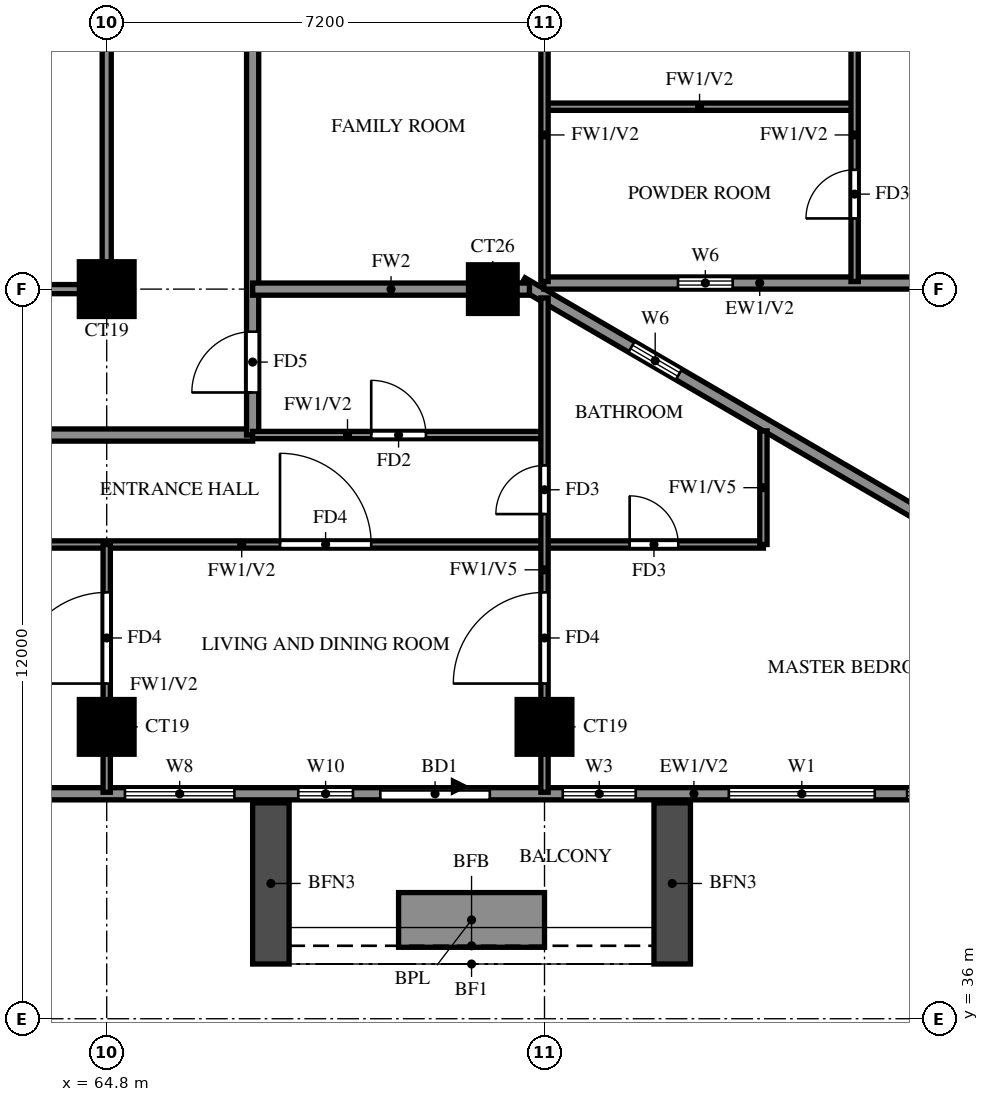
"""IFC4 building model, lengths in metres.
Left out: names, types, materials, properties, quantities, classifications, styles, units other than length and angle.
Written with IfcOpenShell. Run it as: python <this file> out.ifc"""

import sys

from ifc_helpers import new_model, si_unit, direction, frame, frame_2d, origin, origin_2d, place, context, subcontext, project, spatial, rectangle, extrude, source, transform, mapped, element, fill, save


model = new_model("IFC4")
c1 = context("Model", 3, precision=1e-05, world=origin(), true_north=direction((0.0, 1.0)))
c2 = subcontext(c1, "Body", "Model", "MODEL_VIEW")
j1 = project(units=[si_unit("LENGTHUNIT", "METRE"), si_unit("PLANEANGLEUNIT", "RADIAN")], contexts=[c1])
p1 = place(None, origin())
s1 = spatial("IfcSite", under=j1, at=p1, CompositionType="ELEMENT")
p2 = place(p1, origin())
s2 = spatial("IfcBuilding", under=s1, at=p2, CompositionType="ELEMENT")
p3 = place(p2, frame((0.0, 0.0, 185.0)))
s3 = spatial("IfcBuildingStorey", under=s2, at=p3, CompositionType="ELEMENT", Elevation=185.0)
m1 = source(origin(), c2, "Body", "SweptSolid", [
    extrude(rectangle(XDim=0.9, YDim=0.9, at=origin_2d()), origin(), (0.0, 0.0, 1.0), 3.2),
])
for number, where, z_axis, x_axis in (
    (1, (64.8, 40.8, 0.0), (0.0, 0.0, 1.0), (1.0, 0.0, 0.0)),
    (2, (72.0, 40.8, 0.0), (0.0, 0.0, 1.0), (1.0, 0.0, 0.0)),
    (3, (64.8, 48.0, 0.0), (0.0, 0.0, 1.0), (1.0, 0.0, 0.0)),
):
    element("IfcColumn", number, at=place(p3, frame(where, z_axis=z_axis, x_axis=x_axis)), inside=s3, PredefinedType="COLUMN", context=c2, shape_type="MappedRepresentation", body=[
        mapped(m1, transform((0.0, 0.0, 0.0))),
    ])
m2 = source(origin(), c2, "Body", "SweptSolid", [
    extrude(rectangle(XDim=0.8, YDim=0.8, at=origin_2d()), origin(), (0.0, 0.0, 1.0), 3.2),
])
p4 = place(p3, frame((71.15, 48.0, 0.0), z_axis=(0.0, 0.0, 1.0), x_axis=(1.0, 0.0, 0.0)))
e4 = element("IfcColumn", 4, at=p4, inside=s3, PredefinedType="COLUMN", context=c2, shape_type="MappedRepresentation", body=[
    mapped(m2, transform((0.0, 0.0, 0.0))),
])
p5 = place(p3, frame((85.719, 39.881, 0.0), z_axis=(0.0, 0.0, 1.0), x_axis=(-0.86377618652, 0.503875678716, 0.0)))
e5 = element("IfcWall", 5, at=p5, inside=s3, PredefinedType="SOLIDWALL", context=c2, shape_type="SweptSolid", body=[
    extrude(rectangle(XDim=16.311, YDim=0.2, at=frame_2d((8.156, 0.0))), origin(), (0.0, 0.0, 1.0), 3.2),
])
p6 = place(p5, frame((13.326, 0.0, 1.5)))
e6 = element("IfcOpeningElement", 6, at=p6, cuts=e5, PredefinedType="OPENING", context=c2, shape_type="SweptSolid", body=[
    extrude(rectangle(XDim=0.9, YDim=0.9, at=frame_2d((0.45, 0.45))), frame((0.0, 0.11, 0.0), z_axis=(0.0, -1.0, 0.0), x_axis=(1.0, 0.0, 0.0)), (0.0, 0.0, 1.0), 0.22),
])
p7 = place(p3, frame((71.99, 48.1, 0.0), z_axis=(0.0, 0.0, 1.0), x_axis=(1.0, 0.0, 0.0)))
e7 = element("IfcWall", 7, at=p7, inside=s3, PredefinedType="SOLIDWALL", context=c2, shape_type="SweptSolid", body=[
    extrude(rectangle(XDim=6.76, YDim=0.2, at=frame_2d((3.38, 0.0))), origin(), (0.0, 0.0, 1.0), 3.2),
])
p8 = place(p7, frame((2.205, 0.0, 1.5)))
e8 = element("IfcOpeningElement", 8, at=p8, cuts=e7, PredefinedType="OPENING", context=c2, shape_type="SweptSolid", body=[
    extrude(rectangle(XDim=0.9, YDim=0.9, at=frame_2d((0.45, 0.45))), frame((0.0, 0.11, 0.0), z_axis=(0.0, -1.0, 0.0), x_axis=(1.0, 0.0, 0.0)), (0.0, 0.0, 1.0), 0.22),
])
p9 = place(p3, frame((58.8, 39.7, 0.0), z_axis=(0.0, 0.0, 1.0), x_axis=(1.0, 0.0, 0.0)))
e9 = element("IfcWall", 9, at=p9, inside=s3, PredefinedType="SOLIDWALL", context=c2, shape_type="SweptSolid", body=[
    extrude(rectangle(XDim=27.23, YDim=0.2, at=frame_2d((13.615, 0.0))), origin(), (0.0, 0.0, 1.0), 3.2),
])
p10 = place(p9, frame((10.5, 0.0, 0.0)))
e10 = element("IfcOpeningElement", 10, at=p10, cuts=e9, PredefinedType="OPENING", context=c2, shape_type="SweptSolid", body=[
    extrude(rectangle(XDim=1.8, YDim=2.4, at=frame_2d((0.9, 1.2))), frame((0.0, 0.11, 0.0), z_axis=(0.0, -1.0, 0.0), x_axis=(1.0, 0.0, 0.0)), (0.0, 0.0, 1.0), 0.22),
])
p11 = place(p9, frame((6.3, 0.0, 0.6)))
e11 = element("IfcOpeningElement", 11, at=p11, cuts=e9, PredefinedType="OPENING", context=c2, shape_type="SweptSolid", body=[
    extrude(rectangle(XDim=1.8, YDim=2.4, at=frame_2d((0.9, 1.2))), frame((0.0, 0.11, 0.0), z_axis=(0.0, -1.0, 0.0), x_axis=(1.0, 0.0, 0.0)), (0.0, 0.0, 1.0), 0.22),
])
p12 = place(p9, frame((9.15, 0.0, 0.6)))
e12 = element("IfcOpeningElement", 12, at=p12, cuts=e9, PredefinedType="OPENING", context=c2, shape_type="SweptSolid", body=[
    extrude(rectangle(XDim=0.9, YDim=2.4, at=frame_2d((0.45, 1.2))), frame((0.0, 0.11, 0.0), z_axis=(0.0, -1.0, 0.0), x_axis=(1.0, 0.0, 0.0)), (0.0, 0.0, 1.0), 0.22),
])
p13 = place(p9, frame((13.5, 0.0, 0.6)))
e13 = element("IfcOpeningElement", 13, at=p13, cuts=e9, PredefinedType="OPENING", context=c2, shape_type="SweptSolid", body=[
    extrude(rectangle(XDim=1.2, YDim=2.4, at=frame_2d((0.6, 1.2))), frame((0.0, 0.11, 0.0), z_axis=(0.0, -1.0, 0.0), x_axis=(1.0, 0.0, 0.0)), (0.0, 0.0, 1.0), 0.22),
])
p14 = place(p9, frame((16.231, 0.0, 0.6)))
e14 = element("IfcOpeningElement", 14, at=p14, cuts=e9, PredefinedType="OPENING", context=c2, shape_type="SweptSolid", body=[
    extrude(rectangle(XDim=2.4, YDim=2.4, at=frame_2d((1.2, 1.2))), frame((0.0, 0.11, 0.0), z_axis=(0.0, -1.0, 0.0), x_axis=(1.0, 0.0, 0.0)), (0.0, 0.0, 1.0), 0.22),
])
p15 = place(p9, frame((19.163, 0.0, 0.6)))
e15 = element("IfcOpeningElement", 15, at=p15, cuts=e9, PredefinedType="OPENING", context=c2, shape_type="SweptSolid", body=[
    extrude(rectangle(XDim=2.4, YDim=2.4, at=frame_2d((1.2, 1.2))), frame((0.0, 0.11, 0.0), z_axis=(0.0, -1.0, 0.0), x_axis=(1.0, 0.0, 0.0)), (0.0, 0.0, 1.0), 0.22),
])
p16 = place(p9, frame((22.094, 0.0, 0.6)))
e16 = element("IfcOpeningElement", 16, at=p16, cuts=e9, PredefinedType="OPENING", context=c2, shape_type="SweptSolid", body=[
    extrude(rectangle(XDim=2.4, YDim=2.4, at=frame_2d((1.2, 1.2))), frame((0.0, 0.11, 0.0), z_axis=(0.0, -1.0, 0.0), x_axis=(1.0, 0.0, 0.0)), (0.0, 0.0, 1.0), 0.22),
])
p17 = place(p9, frame((25.978, 0.0, 0.6)))
e17 = element("IfcOpeningElement", 17, at=p17, cuts=e9, PredefinedType="OPENING", context=c2, shape_type="SweptSolid", body=[
    extrude(rectangle(XDim=0.9, YDim=2.4, at=frame_2d((0.45, 1.2))), frame((0.0, 0.11, 0.0), z_axis=(0.0, -1.0, 0.0), x_axis=(1.0, 0.0, 0.0)), (0.0, 0.0, 1.0), 0.22),
])
for number, where, z_axis, x_axis in (
    (18, (67.5, 39.55, 0.0), (0.0, 0.0, 1.0), (0.0, -1.0, 0.0)),
    (19, (74.1, 39.55, 0.0), (0.0, 0.0, 1.0), (0.0, -1.0, 0.0)),
):
    element("IfcWall", number, at=place(p3, frame(where, z_axis=z_axis, x_axis=x_axis)), inside=s3, PredefinedType="SOLIDWALL", context=c2, shape_type="SweptSolid", body=[
        extrude(rectangle(XDim=2.65, YDim=0.6, at=frame_2d((1.325, 0.0))), origin(), (0.0, 0.0, 1.0), 2.85),
    ])
p18 = place(p3, frame((69.6, 37.625, 0.0), z_axis=(0.0, 0.0, 1.0), x_axis=(1.0, 0.0, 0.0)))
e20 = element("IfcWall", 20, at=p18, inside=s3, PredefinedType="SOLIDWALL", context=c2, shape_type="SweptSolid", body=[
    extrude(rectangle(XDim=2.4, YDim=0.9, at=frame_2d((1.2, 0.0))), origin(), (0.0, 0.0, 1.0), 0.9),
])
p19 = place(p3, frame((60.0, 45.6, 0.0), z_axis=(0.0, 0.0, 1.0), x_axis=(1.0, 0.0, 0.0)))
e21 = element("IfcWall", 21, at=p19, inside=s3, PredefinedType="SOLIDWALL", context=c2, shape_type="SweptSolid", body=[
    extrude(rectangle(XDim=7.2, YDim=0.2, at=frame_2d((3.6, 0.0))), origin(), (0.0, 0.0, 1.0), 3.2),
])
p20 = place(p3, frame((67.2, 45.6, 0.0), z_axis=(0.0, 0.0, 1.0), x_axis=(0.0, 1.0, 0.0)))
e22 = element("IfcWall", 22, at=p20, inside=s3, PredefinedType="SOLIDWALL", context=c2, shape_type="SweptSolid", body=[
    extrude(rectangle(XDim=16.8, YDim=0.2, at=frame_2d((8.4, 0.0))), origin(), (0.0, 0.0, 1.0), 3.2),
])
p21 = place(p20, frame((8.3, 0.0, 0.0)))
e23 = element("IfcOpeningElement", 23, at=p21, cuts=e22, PredefinedType="OPENING", context=c2, shape_type="SweptSolid", body=[
    extrude(rectangle(XDim=1.0, YDim=2.1, at=frame_2d((0.5, 1.05))), frame((0.0, 0.11, 0.0), z_axis=(0.0, -1.0, 0.0), x_axis=(1.0, 0.0, 0.0)), (0.0, 0.0, 1.0), 0.22),
])
p22 = place(p20, frame((15.1, 0.0, 0.0)))
e24 = element("IfcOpeningElement", 24, at=p22, cuts=e22, PredefinedType="OPENING", context=c2, shape_type="SweptSolid", body=[
    extrude(rectangle(XDim=1.0, YDim=2.1, at=frame_2d((0.5, 1.05))), frame((0.0, 0.11, 0.0), z_axis=(0.0, -1.0, 0.0), x_axis=(1.0, 0.0, 0.0)), (0.0, 0.0, 1.0), 0.22),
])
p23 = place(p20, frame((0.7, 0.0, 0.0)))
e25 = element("IfcOpeningElement", 25, at=p23, cuts=e22, PredefinedType="OPENING", context=c2, shape_type="SweptSolid", body=[
    extrude(rectangle(XDim=1.0, YDim=2.1, at=frame_2d((0.5, 1.05))), frame((0.0, 0.11, 0.0), z_axis=(0.0, -1.0, 0.0), x_axis=(1.0, 0.0, 0.0)), (0.0, 0.0, 1.0), 0.22),
])
p24 = place(p3, frame((67.2, 48.0, 0.0), z_axis=(0.0, 0.0, 1.0), x_axis=(1.0, 0.0, 0.0)))
e26 = element("IfcWall", 26, at=p24, inside=s3, PredefinedType="SOLIDWALL", context=c2, shape_type="SweptSolid", body=[
    extrude(rectangle(XDim=4.552, YDim=0.2, at=frame_2d((2.276, 0.0))), origin(), (0.0, 0.0, 1.0), 3.2),
])
p25 = place(p3, frame((60.0, 43.8, 0.0), z_axis=(0.0, 0.0, 1.0), x_axis=(1.0, 0.0, 0.0)))
e27 = element("IfcWall", 27, at=p25, inside=s3, PredefinedType="PARTITIONING", context=c2, shape_type="SweptSolid", body=[
    extrude(rectangle(XDim=15.6, YDim=0.12, at=frame_2d((7.8, 0.0))), origin(), (0.0, 0.0, 1.0), 3.2),
])
p26 = place(p25, frame((7.65, 0.0, 0.0)))
e28 = element("IfcOpeningElement", 28, at=p26, cuts=e27, PredefinedType="OPENING", context=c2, shape_type="SweptSolid", body=[
    extrude(rectangle(XDim=1.5, YDim=2.1, at=frame_2d((0.75, 1.05))), frame((0.0, 0.07, 0.0), z_axis=(0.0, -1.0, 0.0), x_axis=(1.0, 0.0, 0.0)), (0.0, 0.0, 1.0), 0.14),
])
p27 = place(p25, frame((1.95, 0.0, 0.0)))
e29 = element("IfcOpeningElement", 29, at=p27, cuts=e27, PredefinedType="OPENING", context=c2, shape_type="SweptSolid", body=[
    extrude(rectangle(XDim=0.9, YDim=2.1, at=frame_2d((0.45, 1.05))), frame((0.0, 0.07, 0.0), z_axis=(0.0, -1.0, 0.0), x_axis=(1.0, 0.0, 0.0)), (0.0, 0.0, 1.0), 0.14),
])
p28 = place(p25, frame((13.4, 0.0, 0.0)))
e30 = element("IfcOpeningElement", 30, at=p28, cuts=e27, PredefinedType="OPENING", context=c2, shape_type="SweptSolid", body=[
    extrude(rectangle(XDim=0.8, YDim=2.1, at=frame_2d((0.4, 1.05))), frame((0.0, 0.07, 0.0), z_axis=(0.0, -1.0, 0.0), x_axis=(1.0, 0.0, 0.0)), (0.0, 0.0, 1.0), 0.14),
])
p29 = place(p3, frame((67.2, 45.6, 0.0), z_axis=(0.0, 0.0, 1.0), x_axis=(1.0, 0.0, 0.0)))
e31 = element("IfcWall", 31, at=p29, inside=s3, PredefinedType="PARTITIONING", context=c2, shape_type="SweptSolid", body=[
    extrude(rectangle(XDim=4.8, YDim=0.12, at=frame_2d((2.4, 0.0))), origin(), (0.0, 0.0, 1.0), 3.2),
])
p30 = place(p29, frame((1.95, 0.0, 0.0)))
e32 = element("IfcOpeningElement", 32, at=p30, cuts=e31, PredefinedType="OPENING", context=c2, shape_type="SweptSolid", body=[
    extrude(rectangle(XDim=0.9, YDim=2.1, at=frame_2d((0.45, 1.05))), frame((0.0, 0.07, 0.0), z_axis=(0.0, -1.0, 0.0), x_axis=(1.0, 0.0, 0.0)), (0.0, 0.0, 1.0), 0.14),
])
p31 = place(p3, frame((72.0, 51.0, 0.0), z_axis=(0.0, 0.0, 1.0), x_axis=(1.0, 0.0, 0.0)))
e33 = element("IfcWall", 33, at=p31, inside=s3, PredefinedType="PARTITIONING", context=c2, shape_type="SweptSolid", body=[
    extrude(rectangle(XDim=5.1, YDim=0.12, at=frame_2d((2.55, 0.0))), origin(), (0.0, 0.0, 1.0), 3.2),
])
p32 = place(p3, frame((64.8, 39.725, 0.0), z_axis=(0.0, 0.0, 1.0), x_axis=(0.0, 1.0, 0.0)))
e34 = element("IfcWall", 34, at=p32, inside=s3, PredefinedType="PARTITIONING", context=c2, shape_type="SweptSolid", body=[
    extrude(rectangle(XDim=4.075, YDim=0.12, at=frame_2d((2.038, 0.0))), origin(), (0.0, 0.0, 1.0), 3.2),
])
p33 = place(p32, frame((1.788, 0.0, 0.0)))
e35 = element("IfcOpeningElement", 35, at=p33, cuts=e34, PredefinedType="OPENING", context=c2, shape_type="SweptSolid", body=[
    extrude(rectangle(XDim=1.5, YDim=2.1, at=frame_2d((0.75, 1.05))), frame((0.0, 0.07, 0.0), z_axis=(0.0, -1.0, 0.0), x_axis=(1.0, 0.0, 0.0)), (0.0, 0.0, 1.0), 0.14),
])
p34 = place(p3, frame((72.0, 39.725, 0.0), z_axis=(0.0, 0.0, 1.0), x_axis=(0.0, 1.0, 0.0)))
e36 = element("IfcWall", 36, at=p34, inside=s3, PredefinedType="PARTITIONING", context=c2, shape_type="SweptSolid", body=[
    extrude(rectangle(XDim=8.13, YDim=0.12, at=frame_2d((4.065, 0.0))), origin(), (0.0, 0.0, 1.0), 2.3),
])
p35 = place(p34, frame((1.788, 0.0, 0.0)))
e37 = element("IfcOpeningElement", 37, at=p35, cuts=e36, PredefinedType="OPENING", context=c2, shape_type="SweptSolid", body=[
    extrude(rectangle(XDim=1.5, YDim=2.1, at=frame_2d((0.75, 1.05))), frame((0.0, 0.07, 0.0), z_axis=(0.0, -1.0, 0.0), x_axis=(1.0, 0.0, 0.0)), (0.0, 0.0, 1.0), 0.14),
])
p36 = place(p34, frame((4.575, 0.0, 0.0)))
e38 = element("IfcOpeningElement", 38, at=p36, cuts=e36, PredefinedType="OPENING", context=c2, shape_type="SweptSolid", body=[
    extrude(rectangle(XDim=0.8, YDim=2.1, at=frame_2d((0.4, 1.05))), frame((0.0, 0.07, 0.0), z_axis=(0.0, -1.0, 0.0), x_axis=(1.0, 0.0, 0.0)), (0.0, 0.0, 1.0), 0.14),
])
p37 = place(p3, frame((72.0, 48.125, 0.0), z_axis=(0.0, 0.0, 1.0), x_axis=(0.0, 1.0, 0.0)))
e39 = element("IfcWall", 39, at=p37, inside=s3, PredefinedType="PARTITIONING", context=c2, shape_type="SweptSolid", body=[
    extrude(rectangle(XDim=5.075, YDim=0.12, at=frame_2d((2.538, 0.0))), origin(), (0.0, 0.0, 1.0), 3.2),
])
p38 = place(p3, frame((75.6, 43.8, 0.0), z_axis=(0.0, 0.0, 1.0), x_axis=(0.0, 1.0, 0.0)))
e40 = element("IfcWall", 40, at=p38, inside=s3, PredefinedType="PARTITIONING", context=c2, shape_type="SweptSolid", body=[
    extrude(rectangle(XDim=1.868, YDim=0.12, at=frame_2d((0.934, 0.0))), origin(), (0.0, 0.0, 1.0), 2.3),
])
p39 = place(p3, frame((77.1, 48.125, 0.0), z_axis=(0.0, 0.0, 1.0), x_axis=(0.0, 1.0, 0.0)))
e41 = element("IfcWall", 41, at=p39, inside=s3, PredefinedType="PARTITIONING", context=c2, shape_type="SweptSolid", body=[
    extrude(rectangle(XDim=5.075, YDim=0.12, at=frame_2d((2.538, 0.0))), origin(), (0.0, 0.0, 1.0), 3.2),
])
p40 = place(p39, frame((1.038, 0.0, 0.0)))
e42 = element("IfcOpeningElement", 42, at=p40, cuts=e41, PredefinedType="OPENING", context=c2, shape_type="SweptSolid", body=[
    extrude(rectangle(XDim=0.8, YDim=2.1, at=frame_2d((0.4, 1.05))), frame((0.0, 0.07, 0.0), z_axis=(0.0, -1.0, 0.0), x_axis=(1.0, 0.0, 0.0)), (0.0, 0.0, 1.0), 0.14),
])
p41 = place(p3, frame((57.6, 48.0, 0.0), z_axis=(0.0, 0.0, 1.0), x_axis=(1.0, 0.0, 0.0)))
e43 = element("IfcWall", 43, at=p41, inside=s3, PredefinedType="SOLIDWALL", context=c2, shape_type="SweptSolid", body=[
    extrude(rectangle(XDim=7.2, YDim=0.15, at=frame_2d((3.6, 0.0))), origin(), (0.0, 0.0, 1.0), 2.3),
])
p42 = place(p3, frame((64.8, 48.0, 0.0), z_axis=(0.0, 0.0, 1.0), x_axis=(0.0, 1.0, 0.0)))
e44 = element("IfcWall", 44, at=p42, inside=s3, PredefinedType="SOLIDWALL", context=c2, shape_type="SweptSolid", body=[
    extrude(rectangle(XDim=14.4, YDim=0.15, at=frame_2d((7.2, 0.0))), origin(), (0.0, 0.0, 1.0), 2.3),
])
p43 = place(p6, origin())
e45 = element("IfcWindow", 45, at=p43, inside=s3, PartitioningType="SINGLE_PANEL", PredefinedType="WINDOW", context=c2, shape_type="SweptSolid", body=[
    extrude(rectangle(XDim=0.9, YDim=0.9, at=frame_2d((0.45, 0.45))), frame((0.0, 0.03, 0.0), z_axis=(0.0, -1.0, 0.0), x_axis=(1.0, 0.0, 0.0)), (0.0, 0.0, 1.0), 0.06),
])
fill(e6, e45)
p44 = place(p8, origin())
e46 = element("IfcWindow", 46, at=p44, inside=s3, PartitioningType="SINGLE_PANEL", PredefinedType="WINDOW", context=c2, shape_type="SweptSolid", body=[
    extrude(rectangle(XDim=0.9, YDim=0.9, at=frame_2d((0.45, 0.45))), frame((0.0, 0.03, 0.0), z_axis=(0.0, -1.0, 0.0), x_axis=(1.0, 0.0, 0.0)), (0.0, 0.0, 1.0), 0.06),
])
fill(e8, e46)
p45 = place(p10, origin())
e47 = element("IfcDoor", 47, at=p45, inside=s3, OperationType="DOUBLE_DOOR_SLIDING", PredefinedType="DOOR", context=c2, shape_type="SweptSolid", body=[
    extrude(rectangle(XDim=1.8, YDim=2.4, at=frame_2d((0.9, 1.2))), frame((0.0, 0.025, 0.0), z_axis=(0.0, -1.0, 0.0), x_axis=(1.0, 0.0, 0.0)), (0.0, 0.0, 1.0), 0.05),
])
fill(e10, e47)
p46 = place(p11, origin())
e48 = element("IfcWindow", 48, at=p46, inside=s3, PartitioningType="DOUBLE_PANEL_VERTICAL", PredefinedType="WINDOW", context=c2, shape_type="SweptSolid", body=[
    extrude(rectangle(XDim=1.8, YDim=2.4, at=frame_2d((0.9, 1.2))), frame((0.0, 0.03, 0.0), z_axis=(0.0, -1.0, 0.0), x_axis=(1.0, 0.0, 0.0)), (0.0, 0.0, 1.0), 0.06),
])
fill(e11, e48)
p47 = place(p12, origin())
e49 = element("IfcWindow", 49, at=p47, inside=s3, PartitioningType="SINGLE_PANEL", PredefinedType="WINDOW", context=c2, shape_type="SweptSolid", body=[
    extrude(rectangle(XDim=0.9, YDim=2.4, at=frame_2d((0.45, 1.2))), frame((0.0, 0.03, 0.0), z_axis=(0.0, -1.0, 0.0), x_axis=(1.0, 0.0, 0.0)), (0.0, 0.0, 1.0), 0.06),
])
fill(e12, e49)
p48 = place(p13, origin())
e50 = element("IfcWindow", 50, at=p48, inside=s3, PartitioningType="SINGLE_PANEL", PredefinedType="WINDOW", context=c2, shape_type="SweptSolid", body=[
    extrude(rectangle(XDim=1.2, YDim=2.4, at=frame_2d((0.6, 1.2))), frame((0.0, 0.03, 0.0), z_axis=(0.0, -1.0, 0.0), x_axis=(1.0, 0.0, 0.0)), (0.0, 0.0, 1.0), 0.06),
])
fill(e13, e50)
p49 = place(p14, origin())
e51 = element("IfcWindow", 51, at=p49, inside=s3, PartitioningType="DOUBLE_PANEL_VERTICAL", PredefinedType="WINDOW", context=c2, shape_type="SweptSolid", body=[
    extrude(rectangle(XDim=2.4, YDim=2.4, at=frame_2d((1.2, 1.2))), frame((0.0, 0.03, 0.0), z_axis=(0.0, -1.0, 0.0), x_axis=(1.0, 0.0, 0.0)), (0.0, 0.0, 1.0), 0.06),
])
fill(e14, e51)
p50 = place(p15, origin())
e52 = element("IfcWindow", 52, at=p50, inside=s3, PartitioningType="DOUBLE_PANEL_VERTICAL", PredefinedType="WINDOW", context=c2, shape_type="SweptSolid", body=[
    extrude(rectangle(XDim=2.4, YDim=2.4, at=frame_2d((1.2, 1.2))), frame((0.0, 0.03, 0.0), z_axis=(0.0, -1.0, 0.0), x_axis=(1.0, 0.0, 0.0)), (0.0, 0.0, 1.0), 0.06),
])
fill(e15, e52)
p51 = place(p40, origin())
e53 = element("IfcDoor", 53, at=p51, inside=s3, OperationType="SINGLE_SWING_LEFT", PredefinedType="DOOR", context=c2, shape_type="SweptSolid", body=[
    extrude(rectangle(XDim=0.8, YDim=2.1, at=frame_2d((0.4, 1.05))), frame((0.0, 0.025, 0.0), z_axis=(0.0, -1.0, 0.0), x_axis=(1.0, 0.0, 0.0)), (0.0, 0.0, 1.0), 0.05),
])
fill(e42, e53)
p52 = place(p33, origin())
e54 = element("IfcDoor", 54, at=p52, inside=s3, OperationType="SINGLE_SWING_LEFT", PredefinedType="DOOR", context=c2, shape_type="SweptSolid", body=[
    extrude(rectangle(XDim=1.5, YDim=2.1, at=frame_2d((0.75, 1.05))), frame((0.0, 0.025, 0.0), z_axis=(0.0, -1.0, 0.0), x_axis=(1.0, 0.0, 0.0)), (0.0, 0.0, 1.0), 0.05),
])
fill(e35, e54)
p53 = place(p30, origin())
e55 = element("IfcDoor", 55, at=p53, inside=s3, OperationType="SINGLE_SWING_LEFT", PredefinedType="DOOR", context=c2, shape_type="SweptSolid", body=[
    extrude(rectangle(XDim=0.9, YDim=2.1, at=frame_2d((0.45, 1.05))), frame((0.0, 0.025, 0.0), z_axis=(0.0, -1.0, 0.0), x_axis=(1.0, 0.0, 0.0)), (0.0, 0.0, 1.0), 0.05),
])
fill(e32, e55)
p54 = place(p23, origin())
e56 = element("IfcDoor", 56, at=p54, inside=s3, OperationType="SINGLE_SWING_LEFT", PredefinedType="DOOR", context=c2, shape_type="SweptSolid", body=[
    extrude(rectangle(XDim=1.0, YDim=2.1, at=frame_2d((0.5, 1.05))), frame((0.0, 0.025, 0.0), z_axis=(0.0, -1.0, 0.0), x_axis=(1.0, 0.0, 0.0)), (0.0, 0.0, 1.0), 0.05),
])
fill(e25, e56)
p55 = place(p26, origin())
e57 = element("IfcDoor", 57, at=p55, inside=s3, OperationType="SINGLE_SWING_RIGHT", PredefinedType="DOOR", context=c2, shape_type="SweptSolid", body=[
    extrude(rectangle(XDim=1.5, YDim=2.1, at=frame_2d((0.75, 1.05))), frame((0.0, 0.025, 0.0), z_axis=(0.0, -1.0, 0.0), x_axis=(1.0, 0.0, 0.0)), (0.0, 0.0, 1.0), 0.05),
])
fill(e28, e57)
p56 = place(p35, origin())
e58 = element("IfcDoor", 58, at=p56, inside=s3, OperationType="SINGLE_SWING_RIGHT", PredefinedType="DOOR", context=c2, shape_type="SweptSolid", body=[
    extrude(rectangle(XDim=1.5, YDim=2.1, at=frame_2d((0.75, 1.05))), frame((0.0, 0.025, 0.0), z_axis=(0.0, -1.0, 0.0), x_axis=(1.0, 0.0, 0.0)), (0.0, 0.0, 1.0), 0.05),
])
fill(e37, e58)
p57 = place(p36, origin())
e59 = element("IfcDoor", 59, at=p57, inside=s3, OperationType="SINGLE_SWING_RIGHT", PredefinedType="DOOR", context=c2, shape_type="SweptSolid", body=[
    extrude(rectangle(XDim=0.8, YDim=2.1, at=frame_2d((0.4, 1.05))), frame((0.0, 0.025, 0.0), z_axis=(0.0, -1.0, 0.0), x_axis=(1.0, 0.0, 0.0)), (0.0, 0.0, 1.0), 0.05),
])
fill(e38, e59)
p58 = place(p28, origin())
e60 = element("IfcDoor", 60, at=p58, inside=s3, OperationType="SINGLE_SWING_LEFT", PredefinedType="DOOR", context=c2, shape_type="SweptSolid", body=[
    extrude(rectangle(XDim=0.8, YDim=2.1, at=frame_2d((0.4, 1.05))), frame((0.0, 0.025, 0.0), z_axis=(0.0, -1.0, 0.0), x_axis=(1.0, 0.0, 0.0)), (0.0, 0.0, 1.0), 0.05),
])
fill(e30, e60)
save(model, sys.argv[1])
